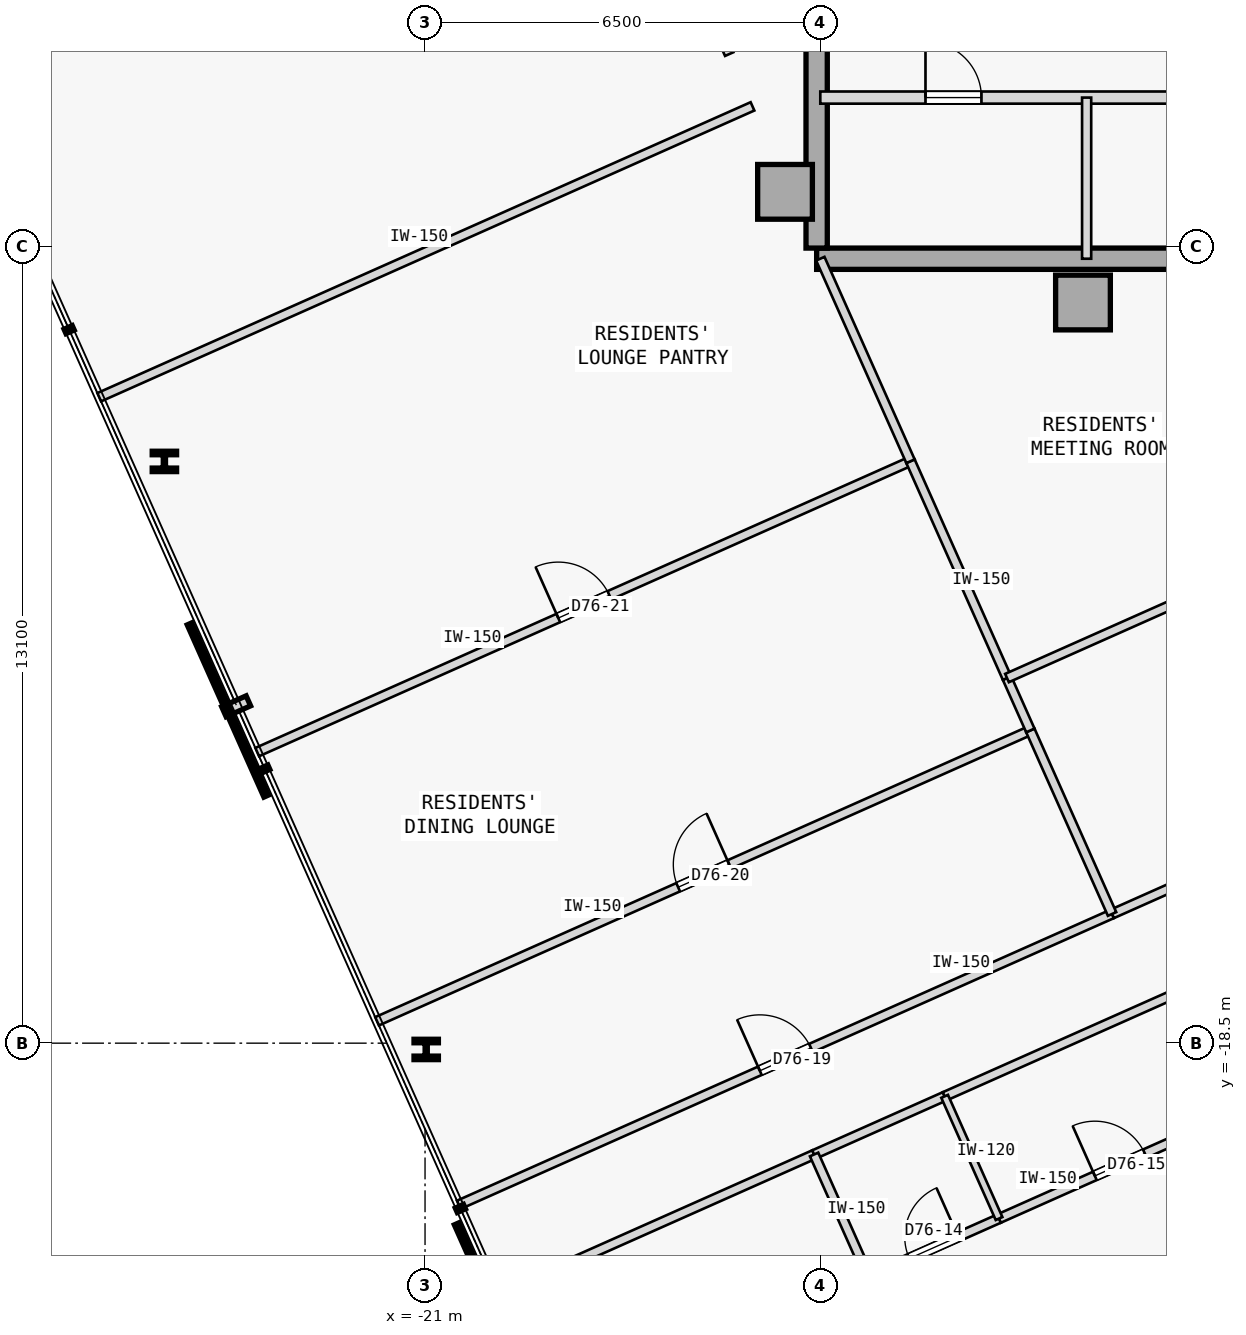
"""IFC4 building model, lengths in metres.
Left out: names, types, materials, properties, quantities, classifications, styles, units other than length and angle.
Written with IfcOpenShell. Run it as: python <this file> out.ifc"""

import sys

from ifc_helpers import new_model, si_unit, direction, frame, frame_2d, origin, origin_2d, place, context, subcontext, project, spatial, rectangle, i_section, extrude, element, fill, save


model = new_model("IFC4")
c1 = context("Model", 3, precision=1e-05, world=origin(), true_north=direction((0.0, 1.0)))
c2 = subcontext(c1, "Body", "Model", "MODEL_VIEW")
j1 = project(units=[si_unit("LENGTHUNIT", "METRE"), si_unit("PLANEANGLEUNIT", "RADIAN")], contexts=[c1])
p1 = place(None, origin())
s1 = spatial("IfcSite", under=j1, at=p1, CompositionType="ELEMENT")
p2 = place(p1, origin())
s2 = spatial("IfcBuilding", under=s1, at=p2, CompositionType="ELEMENT")
p3 = place(p2, frame((0.0, 0.0, 285.25)))
s3 = spatial("IfcBuildingStorey", under=s2, at=p3, CompositionType="ELEMENT", Elevation=285.25)
for number, where, z_axis, x_axis in (
    (1, (-15.08, -4.5, 0.0), (0.0, 0.0, 1.0), (1.0, 0.0, 0.0)),
    (2, (-10.18, -6.32, 0.0), (0.0, 0.0, 1.0), (1.0, 0.0, 0.0)),
):
    element("IfcColumn", number, at=place(p3, frame(where, z_axis=z_axis, x_axis=x_axis)), inside=s3, PredefinedType="COLUMN", context=c2, shape_type="SweptSolid", body=[
        extrude(rectangle(XDim=0.9, YDim=0.9, at=origin_2d()), origin(), (0.0, 0.0, 1.0), 3.35),
    ])
p4 = place(p3, frame((-14.56, -5.6, 0.0), z_axis=(0.0, 0.0, 1.0), x_axis=(1.0, 0.0, 0.0)))
e3 = element("IfcWall", 3, at=p4, inside=s3, PredefinedType="SHEAR", context=c2, shape_type="SweptSolid", body=[
    extrude(rectangle(XDim=10.86, YDim=0.35, at=frame_2d((5.43, 0.0))), origin(), (0.0, 0.0, 1.0), 3.125),
])
p5 = place(p3, frame((-14.56, -5.425, 0.0), z_axis=(0.0, 0.0, 1.0), x_axis=(0.0, 1.0, 0.0)))
e4 = element("IfcWall", 4, at=p5, inside=s3, PredefinedType="SHEAR", context=c2, shape_type="SweptSolid", body=[
    extrude(rectangle(XDim=10.85, YDim=0.35, at=frame_2d((5.425, 0.0))), origin(), (0.0, 0.0, 1.0), 3.125),
])
for number, where, z_axis, x_axis in (
    (5, (-25.286, -8.933, 0.0), (0.0, 0.0, 1.0), (1.0, 0.0, 0.0)),
    (6, (-20.981, -18.603, 0.0), (0.0, 0.0, 1.0), (1.0, 0.0, 0.0)),
):
    element("IfcColumn", number, at=place(p3, frame(where, z_axis=z_axis, x_axis=x_axis)), inside=s3, PredefinedType="COLUMN", context=c2, shape_type="SweptSolid", body=[
        extrude(i_section(OverallWidth=0.401, OverallDepth=0.335, WebThickness=0.036, FlangeThickness=0.058, FilletRadius=0.015, at=origin_2d()), origin(), (0.0, 0.0, 1.0), 3.35),
    ])
p6 = place(p3, frame((-14.5, -2.95, 0.0), z_axis=(0.0, 0.0, 1.0), x_axis=(1.0, 0.0, 0.0)))
e7 = element("IfcWall", 7, at=p6, inside=s3, PredefinedType="STANDARD", context=c2, shape_type="SweptSolid", body=[
    extrude(rectangle(XDim=10.8, YDim=0.2, at=frame_2d((5.4, 0.0))), origin(), (0.0, 0.0, 1.0), 3.125),
])
p7 = place(p6, frame((9.17, 0.0, 0.0)))
e8 = element("IfcOpeningElement", 8, at=p7, cuts=e7, PredefinedType="OPENING", context=c2, shape_type="SweptSolid", body=[
    extrude(rectangle(XDim=1.1, YDim=2.15, at=frame_2d((0.55, 1.075))), frame((0.0, 0.11, 0.0), z_axis=(0.0, -1.0, 0.0), x_axis=(1.0, 0.0, 0.0)), (0.0, 0.0, 1.0), 0.22),
])
p8 = place(p6, frame((1.73, 0.0, 0.0)))
e9 = element("IfcOpeningElement", 9, at=p8, cuts=e7, PredefinedType="OPENING", context=c2, shape_type="SweptSolid", body=[
    extrude(rectangle(XDim=0.92, YDim=2.15, at=frame_2d((0.46, 1.075))), frame((0.0, 0.11, 0.0), z_axis=(0.0, -1.0, 0.0), x_axis=(1.0, 0.0, 0.0)), (0.0, 0.0, 1.0), 0.22),
])
p9 = place(p6, frame((6.05, 0.0, 0.0)))
e10 = element("IfcOpeningElement", 10, at=p9, cuts=e7, PredefinedType="OPENING", context=c2, shape_type="SweptSolid", body=[
    extrude(rectangle(XDim=0.92, YDim=2.15, at=frame_2d((0.46, 1.075))), frame((0.0, 0.11, 0.0), z_axis=(0.0, -1.0, 0.0), x_axis=(1.0, 0.0, 0.0)), (0.0, 0.0, 1.0), 0.22),
])
p10 = place(p3, frame((-10.12, -5.6, 0.0), z_axis=(0.0, 0.0, 1.0), x_axis=(0.0, 1.0, 0.0)))
e11 = element("IfcWall", 11, at=p10, inside=s3, PredefinedType="PARTITIONING", context=c2, shape_type="SweptSolid", body=[
    extrude(rectangle(XDim=2.65, YDim=0.15, at=frame_2d((1.325, 0.0))), origin(), (0.0, 0.0, 1.0), 3.125),
])
p11 = place(p3, frame((-19.786, -22.639, 0.0), z_axis=(0.0, 0.0, 1.0), x_axis=(0.913559465571, 0.406705179295, 0.0)))
e12 = element("IfcWall", 12, at=p11, inside=s3, PredefinedType="PARTITIONING", context=c2, shape_type="SweptSolid", body=[
    extrude(rectangle(XDim=5.675, YDim=0.15, at=frame_2d((2.837, 0.0))), origin(), (0.0, 0.0, 1.0), 3.125),
])
p12 = place(p3, frame((-14.602, -20.331, 0.0), z_axis=(0.0, 0.0, 1.0), x_axis=(0.913502828817, 0.406832375486, 0.0)))
e13 = element("IfcWall", 13, at=p12, inside=s3, PredefinedType="PARTITIONING", context=c2, shape_type="SweptSolid", body=[
    extrude(rectangle(XDim=2.35, YDim=0.15, at=frame_2d((1.175, 0.0))), origin(), (0.0, 0.0, 1.0), 3.125),
])
p13 = place(p3, frame((-12.455, -19.375, 0.0), z_axis=(0.0, 0.0, 1.0), x_axis=(0.913545193015, 0.406737237438, 0.0)))
e14 = element("IfcWall", 14, at=p13, inside=s3, PredefinedType="PARTITIONING", context=c2, shape_type="SweptSolid", body=[
    extrude(rectangle(XDim=4.35, YDim=0.15, at=frame_2d((2.175, 0.0))), origin(), (0.0, 0.0, 1.0), 3.125),
])
p14 = place(p3, frame((-20.445, -21.159, 0.0), z_axis=(0.0, 0.0, 1.0), x_axis=(0.913547681516, 0.406731648137, 0.0)))
e15 = element("IfcWall", 15, at=p14, inside=s3, PredefinedType="PARTITIONING", context=c2, shape_type="SweptSolid", body=[
    extrude(rectangle(XDim=11.76, YDim=0.15, at=frame_2d((5.88, 0.0))), origin(), (0.0, 0.0, 1.0), 3.125),
])
p15 = place(p14, frame((5.42, 0.0, 0.0)))
e16 = element("IfcOpeningElement", 16, at=p15, cuts=e15, PredefinedType="OPENING", context=c2, shape_type="SweptSolid", body=[
    extrude(rectangle(XDim=0.92, YDim=2.15, at=frame_2d((0.46, 1.075))), frame((0.0, 0.085, 0.0), z_axis=(0.0, -1.0, 0.0), x_axis=(1.0, 0.0, 0.0)), (0.0, 0.0, 1.0), 0.17),
])
p16 = place(p3, frame((-9.702, -16.375, 0.0), z_axis=(0.0, 0.0, 1.0), x_axis=(0.913552389019, 0.406721074594, 0.0)))
e17 = element("IfcWall", 17, at=p16, inside=s3, PredefinedType="PARTITIONING", context=c2, shape_type="SweptSolid", body=[
    extrude(rectangle(XDim=6.57, YDim=0.15, at=frame_2d((3.285, 0.0))), origin(), (0.0, 0.0, 1.0), 3.125),
])
p17 = place(p16, frame((2.825, 0.0, 0.0)))
e18 = element("IfcOpeningElement", 18, at=p17, cuts=e17, PredefinedType="OPENING", context=c2, shape_type="SweptSolid", body=[
    extrude(rectangle(XDim=0.92, YDim=2.15, at=frame_2d((0.46, 1.075))), frame((0.0, 0.085, 0.0), z_axis=(0.0, -1.0, 0.0), x_axis=(1.0, 0.0, 0.0)), (0.0, 0.0, 1.0), 0.17),
])
p18 = place(p3, frame((-13.707, -22.34, 0.0), z_axis=(0.0, 0.0, 1.0), x_axis=(-0.406725294076, 0.913550510459, 0.0)))
e19 = element("IfcWall", 19, at=p18, inside=s3, PredefinedType="PARTITIONING", context=c2, shape_type="SweptSolid", body=[
    extrude(rectangle(XDim=2.2, YDim=0.15, at=frame_2d((1.1, 0.0))), origin(), (0.0, 0.0, 1.0), 3.125),
])
p19 = place(p3, frame((-13.707, -22.34, 0.0), z_axis=(0.0, 0.0, 1.0), x_axis=(0.913541436194, 0.406745675276, 0.0)))
e20 = element("IfcWall", 20, at=p19, inside=s3, PredefinedType="PARTITIONING", context=c2, shape_type="SweptSolid", body=[
    extrude(rectangle(XDim=2.35, YDim=0.15, at=frame_2d((1.175, 0.0))), origin(), (0.0, 0.0, 1.0), 3.125),
])
p20 = place(p19, frame((0.735, 0.0, 0.0)))
e21 = element("IfcOpeningElement", 21, at=p20, cuts=e20, PredefinedType="OPENING", context=c2, shape_type="SweptSolid", body=[
    extrude(rectangle(XDim=0.88, YDim=2.15, at=frame_2d((0.44, 1.075))), frame((0.0, 0.085, 0.0), z_axis=(0.0, -1.0, 0.0), x_axis=(1.0, 0.0, 0.0)), (0.0, 0.0, 1.0), 0.17),
])
p21 = place(p3, frame((-11.56, -21.385, 0.0), z_axis=(0.0, 0.0, 1.0), x_axis=(0.913533624044, 0.406763220732, 0.0)))
e22 = element("IfcWall", 22, at=p21, inside=s3, PredefinedType="PARTITIONING", context=c2, shape_type="SweptSolid", body=[
    extrude(rectangle(XDim=4.35, YDim=0.15, at=frame_2d((2.175, 0.0))), origin(), (0.0, 0.0, 1.0), 3.125),
])
p22 = place(p21, frame((1.725, 0.0, 0.0)))
e23 = element("IfcOpeningElement", 23, at=p22, cuts=e22, PredefinedType="OPENING", context=c2, shape_type="SweptSolid", body=[
    extrude(rectangle(XDim=0.9, YDim=2.15, at=frame_2d((0.45, 1.075))), frame((0.0, 0.085, 0.0), z_axis=(0.0, -1.0, 0.0), x_axis=(1.0, 0.0, 0.0)), (0.0, 0.0, 1.0), 0.17),
])
p23 = place(p3, frame((-11.56, -21.385, 0.0), z_axis=(0.0, 0.0, 1.0), x_axis=(-0.406684063321, 0.913568865845, 0.0)))
e24 = element("IfcWall", 24, at=p23, inside=s3, PredefinedType="PARTITIONING", context=c2, shape_type="SweptSolid", body=[
    extrude(rectangle(XDim=2.2, YDim=0.12, at=frame_2d((1.1, 0.0))), origin(), (0.0, 0.0, 1.0), 3.125),
])
p24 = place(p3, frame((-21.789, -18.14, 0.0), z_axis=(0.0, 0.0, 1.0), x_axis=(0.913544247064, 0.406739362069, 0.0)))
e25 = element("IfcWall", 25, at=p24, inside=s3, PredefinedType="PARTITIONING", context=c2, shape_type="SweptSolid", body=[
    extrude(rectangle(XDim=11.76, YDim=0.15, at=frame_2d((5.88, 0.0))), origin(), (0.0, 0.0, 1.0), 3.125),
])
p25 = place(p24, frame((5.42, 0.0, 0.0)))
e26 = element("IfcOpeningElement", 26, at=p25, cuts=e25, PredefinedType="OPENING", context=c2, shape_type="SweptSolid", body=[
    extrude(rectangle(XDim=0.92, YDim=2.15, at=frame_2d((0.46, 1.075))), frame((0.0, 0.085, 0.0), z_axis=(0.0, -1.0, 0.0), x_axis=(1.0, 0.0, 0.0)), (0.0, 0.0, 1.0), 0.17),
])
p26 = place(p3, frame((-9.702, -16.375, 0.0), z_axis=(0.0, 0.0, 1.0), x_axis=(-0.406775972158, 0.913527946193, 0.0)))
e27 = element("IfcWall", 27, at=p26, inside=s3, PredefinedType="PARTITIONING", context=c2, shape_type="SweptSolid", body=[
    extrude(rectangle(XDim=3.304, YDim=0.15, at=frame_2d((1.652, 0.0))), origin(), (0.0, 0.0, 1.0), 3.125),
])
p27 = place(p3, frame((-23.76, -13.713, 0.0), z_axis=(0.0, 0.0, 1.0), x_axis=(0.913544247064, 0.406739362069, 0.0)))
e28 = element("IfcWall", 28, at=p27, inside=s3, PredefinedType="PARTITIONING", context=c2, shape_type="SweptSolid", body=[
    extrude(rectangle(XDim=11.76, YDim=0.15, at=frame_2d((5.88, 0.0))), origin(), (0.0, 0.0, 1.0), 3.125),
])
p28 = place(p27, frame((5.42, 0.0, 0.0)))
e29 = element("IfcOpeningElement", 29, at=p28, cuts=e28, PredefinedType="OPENING", context=c2, shape_type="SweptSolid", body=[
    extrude(rectangle(XDim=0.92, YDim=2.15, at=frame_2d((0.46, 1.075))), frame((0.0, 0.085, 0.0), z_axis=(0.0, -1.0, 0.0), x_axis=(1.0, 0.0, 0.0)), (0.0, 0.0, 1.0), 0.17),
])
p29 = place(p3, frame((-11.046, -13.357, 0.0), z_axis=(0.0, 0.0, 1.0), x_axis=(-0.406474743084, 0.913662018054, 0.0)))
e30 = element("IfcWall", 30, at=p29, inside=s3, PredefinedType="PARTITIONING", context=c2, shape_type="SweptSolid", body=[
    extrude(rectangle(XDim=0.943, YDim=0.15, at=frame_2d((0.471, 0.0))), origin(), (0.0, 0.0, 1.0), 3.125),
])
p30 = place(p3, frame((-11.429, -12.496, 0.0), z_axis=(0.0, 0.0, 1.0), x_axis=(-0.406782597231, 0.91352499615, 0.0)))
e31 = element("IfcWall", 31, at=p30, inside=s3, PredefinedType="PARTITIONING", context=c2, shape_type="SweptSolid", body=[
    extrude(rectangle(XDim=3.903, YDim=0.15, at=frame_2d((1.951, 0.0))), origin(), (0.0, 0.0, 1.0), 3.125),
])
p31 = place(p3, frame((-26.358, -7.878, 0.0), z_axis=(0.0, 0.0, 1.0), x_axis=(0.913547681516, 0.406731648137, 0.0)))
e32 = element("IfcWall", 32, at=p31, inside=s3, PredefinedType="PARTITIONING", context=c2, shape_type="SweptSolid", body=[
    extrude(rectangle(XDim=11.76, YDim=0.15, at=frame_2d((5.88, 0.0))), origin(), (0.0, 0.0, 1.0), 3.125),
])
p32 = place(p3, frame((-13.017, -8.93, 0.0), z_axis=(0.0, 0.0, 1.0), x_axis=(-0.406722395322, 0.913551801018, 0.0)))
e33 = element("IfcWall", 33, at=p32, inside=s3, PredefinedType="PARTITIONING", context=c2, shape_type="SweptSolid", body=[
    extrude(rectangle(XDim=3.646, YDim=0.15, at=frame_2d((1.823, 0.0))), origin(), (0.0, 0.0, 1.0), 3.125),
])
p33 = place(p3, frame((-15.998, -2.235, 0.0), z_axis=(0.0, 0.0, 1.0), x_axis=(-0.406736853191, 0.913545364093, 0.0)))
e34 = element("IfcWall", 34, at=p33, inside=s3, PredefinedType="PARTITIONING", context=c2, shape_type="SweptSolid", body=[
    extrude(rectangle(XDim=6.548, YDim=0.15, at=frame_2d((3.274, 0.0))), origin(), (0.0, 0.0, 1.0), 3.125),
])
p34 = place(p3, frame((-11.429, -12.496, 0.0), z_axis=(0.0, 0.0, 1.0), x_axis=(0.913544816238, 0.406738083692, 0.0)))
e35 = element("IfcWall", 35, at=p34, inside=s3, PredefinedType="PARTITIONING", context=c2, shape_type="SweptSolid", body=[
    extrude(rectangle(XDim=8.461, YDim=0.15, at=frame_2d((4.23, 0.0))), origin(), (0.0, 0.0, 1.0), 3.125),
])
p35 = place(p8, origin())
e36 = element("IfcDoor", 36, at=p35, inside=s3, OperationType="SINGLE_SWING_LEFT", PredefinedType="DOOR", context=c2, shape_type="SweptSolid", body=[
    extrude(rectangle(XDim=0.92, YDim=2.15, at=frame_2d((0.46, 1.075))), frame((0.0, 0.025, 0.0), z_axis=(0.0, -1.0, 0.0), x_axis=(1.0, 0.0, 0.0)), (0.0, 0.0, 1.0), 0.05),
])
fill(e9, e36)
p36 = place(p20, origin())
e37 = element("IfcDoor", 37, at=p36, inside=s3, OperationType="SINGLE_SWING_RIGHT", PredefinedType="DOOR", context=c2, shape_type="SweptSolid", body=[
    extrude(rectangle(XDim=0.88, YDim=2.15, at=frame_2d((0.44, 1.075))), frame((0.0, 0.025, 0.0), z_axis=(0.0, -1.0, 0.0), x_axis=(1.0, 0.0, 0.0)), (0.0, 0.0, 1.0), 0.05),
])
fill(e21, e37)
p37 = place(p22, origin())
e38 = element("IfcDoor", 38, at=p37, inside=s3, OperationType="SINGLE_SWING_LEFT", PredefinedType="DOOR", context=c2, shape_type="SweptSolid", body=[
    extrude(rectangle(XDim=0.9, YDim=2.15, at=frame_2d((0.45, 1.075))), frame((0.0, 0.025, 0.0), z_axis=(0.0, -1.0, 0.0), x_axis=(1.0, 0.0, 0.0)), (0.0, 0.0, 1.0), 0.05),
])
fill(e23, e38)
p38 = place(p15, origin())
e39 = element("IfcDoor", 39, at=p38, inside=s3, OperationType="SINGLE_SWING_LEFT", PredefinedType="DOOR", context=c2, shape_type="SweptSolid", body=[
    extrude(rectangle(XDim=0.92, YDim=2.15, at=frame_2d((0.46, 1.075))), frame((0.0, 0.025, 0.0), z_axis=(0.0, -1.0, 0.0), x_axis=(1.0, 0.0, 0.0)), (0.0, 0.0, 1.0), 0.05),
])
fill(e16, e39)
p39 = place(p25, origin())
e40 = element("IfcDoor", 40, at=p39, inside=s3, OperationType="SINGLE_SWING_RIGHT", PredefinedType="DOOR", context=c2, shape_type="SweptSolid", body=[
    extrude(rectangle(XDim=0.92, YDim=2.15, at=frame_2d((0.46, 1.075))), frame((0.0, 0.025, 0.0), z_axis=(0.0, -1.0, 0.0), x_axis=(1.0, 0.0, 0.0)), (0.0, 0.0, 1.0), 0.05),
])
fill(e26, e40)
p40 = place(p28, origin())
e41 = element("IfcDoor", 41, at=p40, inside=s3, OperationType="SINGLE_SWING_LEFT", PredefinedType="DOOR", context=c2, shape_type="SweptSolid", body=[
    extrude(rectangle(XDim=0.92, YDim=2.15, at=frame_2d((0.46, 1.075))), frame((0.0, 0.025, 0.0), z_axis=(0.0, -1.0, 0.0), x_axis=(1.0, 0.0, 0.0)), (0.0, 0.0, 1.0), 0.05),
])
fill(e29, e41)
save(model, sys.argv[1])
